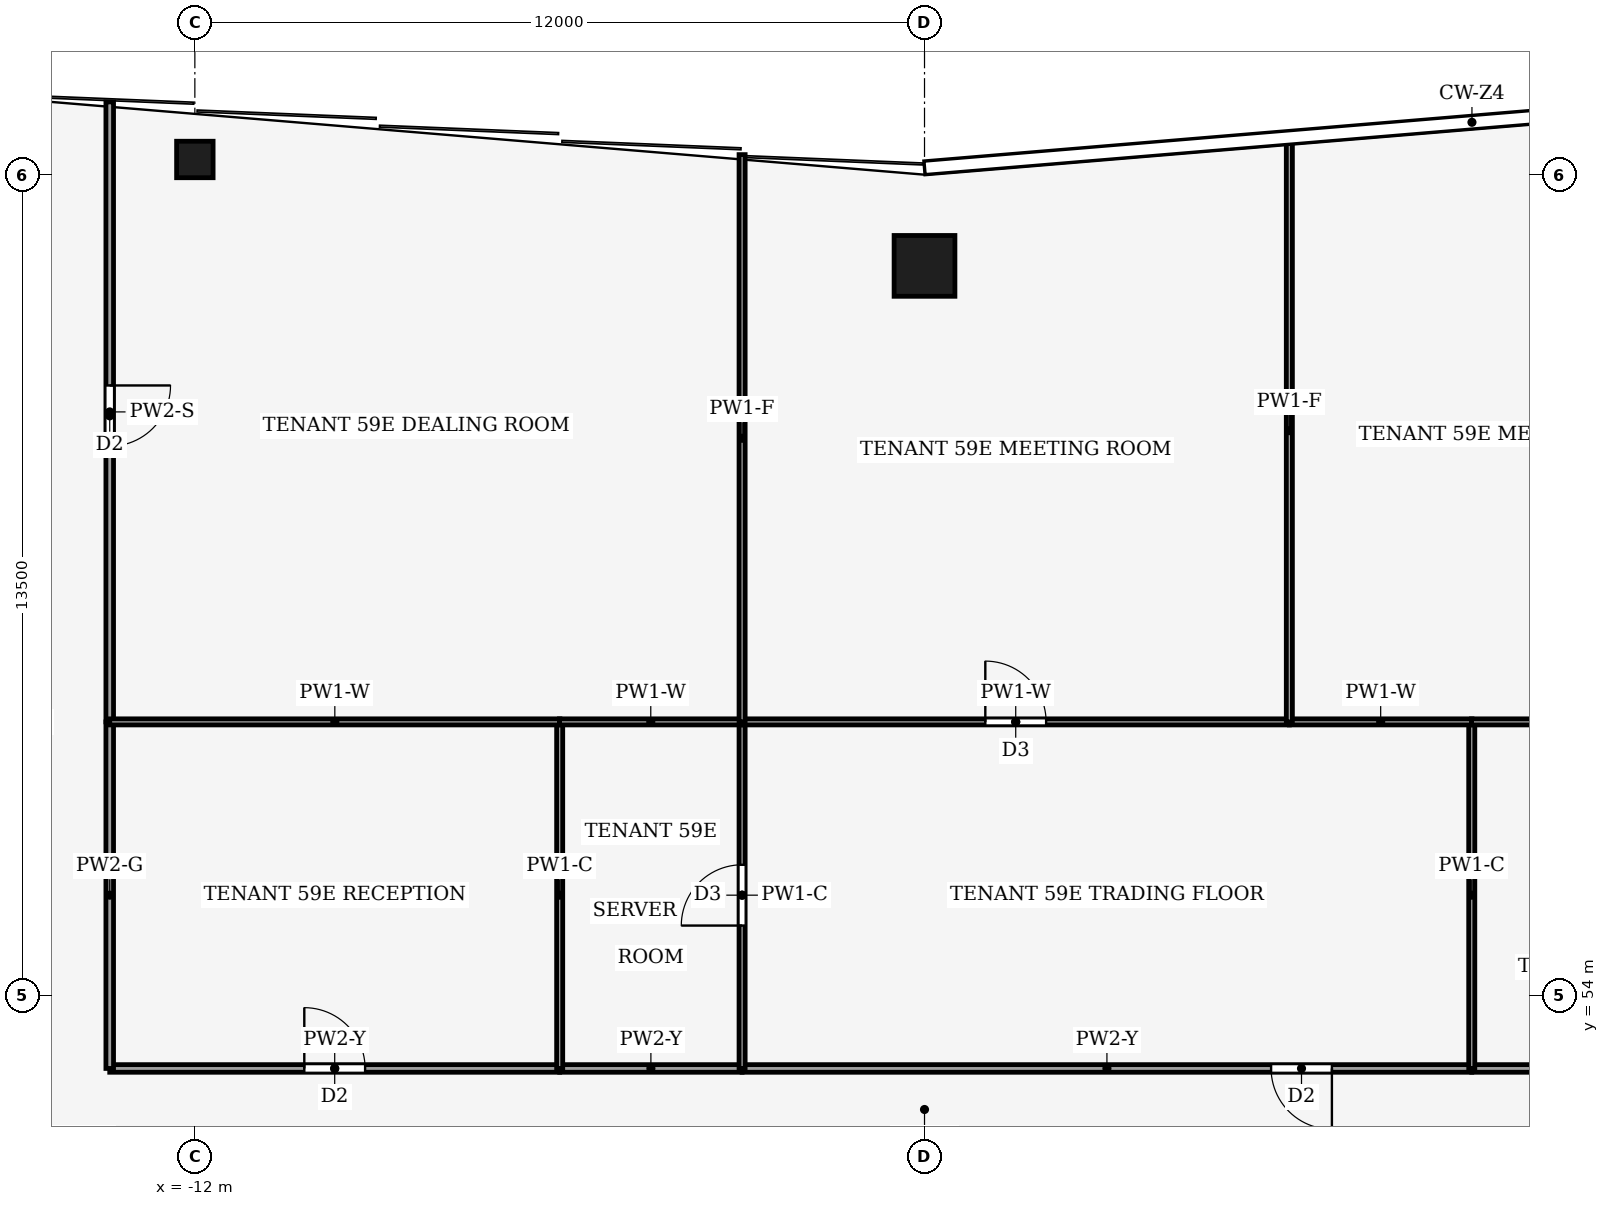
"""IFC4 building model, lengths in metres.
Left out: names, types, materials, properties, quantities, classifications, styles, units other than length and angle.
Written with IfcOpenShell. Run it as: python <this file> out.ifc"""

import sys

from ifc_helpers import new_model, si_unit, direction, frame, frame_2d, origin, origin_2d, place, context, subcontext, project, spatial, rectangle, hollow_rectangle, extrude, element, fill, save


model = new_model("IFC4")
c1 = context("Model", 3, precision=1e-05, world=origin(), true_north=direction((0.0, 1.0)))
c2 = subcontext(c1, "Body", "Model", "MODEL_VIEW")
j1 = project(units=[si_unit("LENGTHUNIT", "METRE"), si_unit("PLANEANGLEUNIT", "RADIAN")], contexts=[c1])
p1 = place(None, origin())
s1 = spatial("IfcSite", under=j1, at=p1, CompositionType="ELEMENT")
p2 = place(p1, origin())
s2 = spatial("IfcBuilding", under=s1, at=p2, CompositionType="ELEMENT")
p3 = place(p2, frame((0.0, 0.0, 258.0)))
s3 = spatial("IfcBuildingStorey", under=s2, at=p3, CompositionType="ELEMENT", Elevation=258.0)
p4 = place(p3, frame((0.0, 66.0, 0.0), z_axis=(0.0, 0.0, 1.0), x_axis=(1.0, 0.0, 0.0)))
e1 = element("IfcColumn", 1, at=p4, inside=s3, PredefinedType="COLUMN", context=c2, shape_type="SweptSolid", body=[
    extrude(hollow_rectangle(XDim=1.0, YDim=1.0, WallThickness=0.045, at=origin_2d()), origin(), (0.0, 0.0, 1.0), 4.0),
])
p5 = place(p3, frame((-12.0, 67.75, 0.0), z_axis=(0.0, 0.0, 1.0), x_axis=(1.0, 0.0, 0.0)))
e2 = element("IfcColumn", 2, at=p5, inside=s3, PredefinedType="COLUMN", context=c2, shape_type="SweptSolid", body=[
    extrude(hollow_rectangle(XDim=0.6, YDim=0.6, WallThickness=0.025, at=origin_2d()), origin(), (0.0, 0.0, 1.0), 4.0),
])
p6 = place(p3, frame((-13.4, 52.8, 0.0), z_axis=(0.0, 0.0, 1.0), x_axis=(1.0, 0.0, 0.0)))
e3 = element("IfcWall", 3, at=p6, inside=s3, PredefinedType="PARTITIONING", context=c2, shape_type="SweptSolid", body=[
    extrude(rectangle(XDim=7.4, YDim=0.125, at=frame_2d((3.7, 0.0))), origin(), (0.0, 0.0, 1.0), 3.24),
])
p7 = place(p6, frame((3.2, 0.0, 0.0)))
e4 = element("IfcOpeningElement", 4, at=p7, cuts=e3, PredefinedType="OPENING", context=c2, shape_type="SweptSolid", body=[
    extrude(rectangle(XDim=1.0, YDim=2.1, at=frame_2d((0.5, 1.05))), frame((0.0, 0.073, 0.0), z_axis=(0.0, -1.0, 0.0), x_axis=(1.0, 0.0, 0.0)), (0.0, 0.0, 1.0), 0.145),
])
p8 = place(p3, frame((-13.4, 52.8, 0.0), z_axis=(0.0, 0.0, 1.0), x_axis=(0.0, 1.0, 0.0)))
e5 = element("IfcWall", 5, at=p8, inside=s3, PredefinedType="PARTITIONING", context=c2, shape_type="SweptSolid", body=[
    extrude(rectangle(XDim=5.7, YDim=0.125, at=frame_2d((2.85, 0.0))), origin(), (0.0, 0.0, 1.0), 3.87),
])
p9 = place(p3, frame((-3.0, 52.8, 0.0), z_axis=(0.0, 0.0, 1.0), x_axis=(-1.0, 0.0, 0.0)))
e6 = element("IfcWall", 6, at=p9, inside=s3, PredefinedType="PARTITIONING", context=c2, shape_type="SweptSolid", body=[
    extrude(rectangle(XDim=3.0, YDim=0.125, at=frame_2d((1.5, 0.0))), origin(), (0.0, 0.0, 1.0), 3.24),
])
p10 = place(p3, frame((9.0, 52.8, 0.0), z_axis=(0.0, 0.0, 1.0), x_axis=(-1.0, 0.0, 0.0)))
e7 = element("IfcWall", 7, at=p10, inside=s3, PredefinedType="PARTITIONING", context=c2, shape_type="SweptSolid", body=[
    extrude(rectangle(XDim=12.0, YDim=0.125, at=frame_2d((6.0, 0.0))), origin(), (0.0, 0.0, 1.0), 3.24),
])
p11 = place(p10, frame((2.3, 0.0, 0.0)))
e8 = element("IfcOpeningElement", 8, at=p11, cuts=e7, PredefinedType="OPENING", context=c2, shape_type="SweptSolid", body=[
    extrude(rectangle(XDim=1.0, YDim=2.1, at=frame_2d((0.5, 1.05))), frame((0.0, 0.073, 0.0), z_axis=(0.0, -1.0, 0.0), x_axis=(1.0, 0.0, 0.0)), (0.0, 0.0, 1.0), 0.145),
])
p12 = place(p3, frame((13.4, 52.8, 0.0), z_axis=(0.0, 0.0, 1.0), x_axis=(-1.0, 0.0, 0.0)))
e9 = element("IfcWall", 9, at=p12, inside=s3, PredefinedType="PARTITIONING", context=c2, shape_type="SweptSolid", body=[
    extrude(rectangle(XDim=4.4, YDim=0.125, at=frame_2d((2.2, 0.0))), origin(), (0.0, 0.0, 1.0), 3.24),
])
p13 = place(p3, frame((-13.4, 68.697, 0.0), z_axis=(0.0, 0.0, 1.0), x_axis=(0.0, -1.0, 0.0)))
e10 = element("IfcWall", 10, at=p13, inside=s3, PredefinedType="PARTITIONING", context=c2, shape_type="SweptSolid", body=[
    extrude(rectangle(XDim=10.197, YDim=0.125, at=frame_2d((5.098, 0.0))), origin(), (0.0, 0.0, 1.0), 3.04),
])
p14 = place(p13, frame((4.663, 0.0, 0.0)))
e11 = element("IfcOpeningElement", 11, at=p14, cuts=e10, PredefinedType="OPENING", context=c2, shape_type="SweptSolid", body=[
    extrude(rectangle(XDim=1.0, YDim=2.1, at=frame_2d((0.5, 1.05))), frame((0.0, 0.073, 0.0), z_axis=(0.0, -1.0, 0.0), x_axis=(1.0, 0.0, 0.0)), (0.0, 0.0, 1.0), 0.145),
])
p15 = place(p3, frame((-6.0, 52.8, 0.0), z_axis=(0.0, 0.0, 1.0), x_axis=(0.0, 1.0, 0.0)))
e12 = element("IfcWall", 12, at=p15, inside=s3, PredefinedType="PARTITIONING", context=c2, shape_type="SweptSolid", body=[
    extrude(rectangle(XDim=5.7, YDim=0.1, at=frame_2d((2.85, 0.0))), origin(), (0.0, 0.0, 1.0), 3.87),
])
p16 = place(p3, frame((-5.996, 58.5, 0.0), z_axis=(0.0, 0.0, 1.0), x_axis=(-1.0, 0.0, 0.0)))
e13 = element("IfcWall", 13, at=p16, inside=s3, PredefinedType="PARTITIONING", context=c2, shape_type="SweptSolid", body=[
    extrude(rectangle(XDim=7.404, YDim=0.1, at=frame_2d((3.702, 0.0))), origin(), (0.0, 0.0, 1.0), 3.24),
])
p17 = place(p3, frame((-3.0, 52.8, 0.0), z_axis=(0.0, 0.0, 1.0), x_axis=(0.0, 1.0, 0.0)))
e14 = element("IfcWall", 14, at=p17, inside=s3, PredefinedType="PARTITIONING", context=c2, shape_type="SweptSolid", body=[
    extrude(rectangle(XDim=5.7, YDim=0.1, at=frame_2d((2.85, 0.0))), origin(), (0.0, 0.0, 1.0), 3.87),
])
p18 = place(p17, frame((2.35, 0.0, 0.0)))
e15 = element("IfcOpeningElement", 15, at=p18, cuts=e14, PredefinedType="OPENING", context=c2, shape_type="SweptSolid", body=[
    extrude(rectangle(XDim=1.0, YDim=2.1, at=frame_2d((0.5, 1.05))), frame((0.0, 0.06, 0.0), z_axis=(0.0, -1.0, 0.0), x_axis=(1.0, 0.0, 0.0)), (0.0, 0.0, 1.0), 0.12),
])
p19 = place(p3, frame((-3.0, 58.5, 0.0), z_axis=(0.0, 0.0, 1.0), x_axis=(-1.0, 0.0, 0.0)))
e16 = element("IfcWall", 16, at=p19, inside=s3, PredefinedType="PARTITIONING", context=c2, shape_type="SweptSolid", body=[
    extrude(rectangle(XDim=3.004, YDim=0.1, at=frame_2d((1.502, 0.0))), origin(), (0.0, 0.0, 1.0), 3.24),
])
p20 = place(p3, frame((9.0, 52.8, 0.0), z_axis=(0.0, 0.0, 1.0), x_axis=(0.0, 1.0, 0.0)))
e17 = element("IfcWall", 17, at=p20, inside=s3, PredefinedType="PARTITIONING", context=c2, shape_type="SweptSolid", body=[
    extrude(rectangle(XDim=5.7, YDim=0.1, at=frame_2d((2.85, 0.0))), origin(), (0.0, 0.0, 1.0), 3.87),
])
p21 = place(p3, frame((-3.0, 58.5, 0.0), z_axis=(0.0, 0.0, 1.0), x_axis=(1.0, 0.0, 0.0)))
e18 = element("IfcWall", 18, at=p21, inside=s3, PredefinedType="PARTITIONING", context=c2, shape_type="SweptSolid", body=[
    extrude(rectangle(XDim=9.0, YDim=0.1, at=frame_2d((4.5, 0.0))), origin(), (0.0, 0.0, 1.0), 3.24),
])
p22 = place(p21, frame((4.0, 0.0, 0.0)))
e19 = element("IfcOpeningElement", 19, at=p22, cuts=e18, PredefinedType="OPENING", context=c2, shape_type="SweptSolid", body=[
    extrude(rectangle(XDim=1.0, YDim=2.1, at=frame_2d((0.5, 1.05))), frame((0.0, 0.06, 0.0), z_axis=(0.0, -1.0, 0.0), x_axis=(1.0, 0.0, 0.0)), (0.0, 0.0, 1.0), 0.12),
])
p23 = place(p3, frame((9.004, 58.5, 0.0), z_axis=(0.0, 0.0, 1.0), x_axis=(-1.0, 0.0, 0.0)))
e20 = element("IfcWall", 20, at=p23, inside=s3, PredefinedType="PARTITIONING", context=c2, shape_type="SweptSolid", body=[
    extrude(rectangle(XDim=3.004, YDim=0.1, at=frame_2d((1.502, 0.0))), origin(), (0.0, 0.0, 1.0), 3.24),
])
p24 = place(p3, frame((13.4, 58.5, 0.0), z_axis=(0.0, 0.0, 1.0), x_axis=(-1.0, 0.0, 0.0)))
e21 = element("IfcWall", 21, at=p24, inside=s3, PredefinedType="PARTITIONING", context=c2, shape_type="SweptSolid", body=[
    extrude(rectangle(XDim=4.404, YDim=0.1, at=frame_2d((2.202, 0.0))), origin(), (0.0, 0.0, 1.0), 3.24),
])
p25 = place(p3, frame((-3.0, 58.5, 0.0), z_axis=(0.0, 0.0, 1.0), x_axis=(0.0, 1.0, 0.0)))
e22 = element("IfcWall", 22, at=p25, inside=s3, PredefinedType="PARTITIONING", context=c2, shape_type="SweptSolid", body=[
    extrude(rectangle(XDim=9.33, YDim=0.1, at=frame_2d((4.665, 0.0))), origin(), (0.0, 0.0, 1.0), 3.04),
])
p26 = place(p3, frame((6.0, 58.5, 0.0), z_axis=(0.0, 0.0, 1.0), x_axis=(0.0, 1.0, 0.0)))
e23 = element("IfcWall", 23, at=p26, inside=s3, PredefinedType="PARTITIONING", context=c2, shape_type="SweptSolid", body=[
    extrude(rectangle(XDim=9.58, YDim=0.1, at=frame_2d((4.79, 0.0))), origin(), (0.0, 0.0, 1.0), 3.04),
])
p27 = place(p7, origin())
e24 = element("IfcDoor", 24, at=p27, inside=s3, OperationType="SINGLE_SWING_RIGHT", PredefinedType="DOOR", context=c2, shape_type="SweptSolid", body=[
    extrude(rectangle(XDim=1.0, YDim=2.1, at=frame_2d((0.5, 1.05))), frame((0.0, 0.025, 0.0), z_axis=(0.0, -1.0, 0.0), x_axis=(1.0, 0.0, 0.0)), (0.0, 0.0, 1.0), 0.05),
])
fill(e4, e24)
p28 = place(p11, origin())
e25 = element("IfcDoor", 25, at=p28, inside=s3, OperationType="SINGLE_SWING_LEFT", PredefinedType="DOOR", context=c2, shape_type="SweptSolid", body=[
    extrude(rectangle(XDim=1.0, YDim=2.1, at=frame_2d((0.5, 1.05))), frame((0.0, 0.025, 0.0), z_axis=(0.0, -1.0, 0.0), x_axis=(1.0, 0.0, 0.0)), (0.0, 0.0, 1.0), 0.05),
])
fill(e8, e25)
p29 = place(p14, origin())
e26 = element("IfcDoor", 26, at=p29, inside=s3, OperationType="SINGLE_SWING_RIGHT", PredefinedType="DOOR", context=c2, shape_type="SweptSolid", body=[
    extrude(rectangle(XDim=1.0, YDim=2.1, at=frame_2d((0.5, 1.05))), frame((0.0, 0.025, 0.0), z_axis=(0.0, -1.0, 0.0), x_axis=(1.0, 0.0, 0.0)), (0.0, 0.0, 1.0), 0.05),
])
fill(e11, e26)
p30 = place(p18, origin())
e27 = element("IfcDoor", 27, at=p30, inside=s3, OperationType="SINGLE_SWING_RIGHT", PredefinedType="DOOR", context=c2, shape_type="SweptSolid", body=[
    extrude(rectangle(XDim=1.0, YDim=2.1, at=frame_2d((0.5, 1.05))), frame((0.0, 0.025, 0.0), z_axis=(0.0, -1.0, 0.0), x_axis=(1.0, 0.0, 0.0)), (0.0, 0.0, 1.0), 0.05),
])
fill(e15, e27)
p31 = place(p22, origin())
e28 = element("IfcDoor", 28, at=p31, inside=s3, OperationType="SINGLE_SWING_LEFT", PredefinedType="DOOR", context=c2, shape_type="SweptSolid", body=[
    extrude(rectangle(XDim=1.0, YDim=2.1, at=frame_2d((0.5, 1.05))), frame((0.0, 0.025, 0.0), z_axis=(0.0, -1.0, 0.0), x_axis=(1.0, 0.0, 0.0)), (0.0, 0.0, 1.0), 0.05),
])
fill(e19, e28)
save(model, sys.argv[1])
